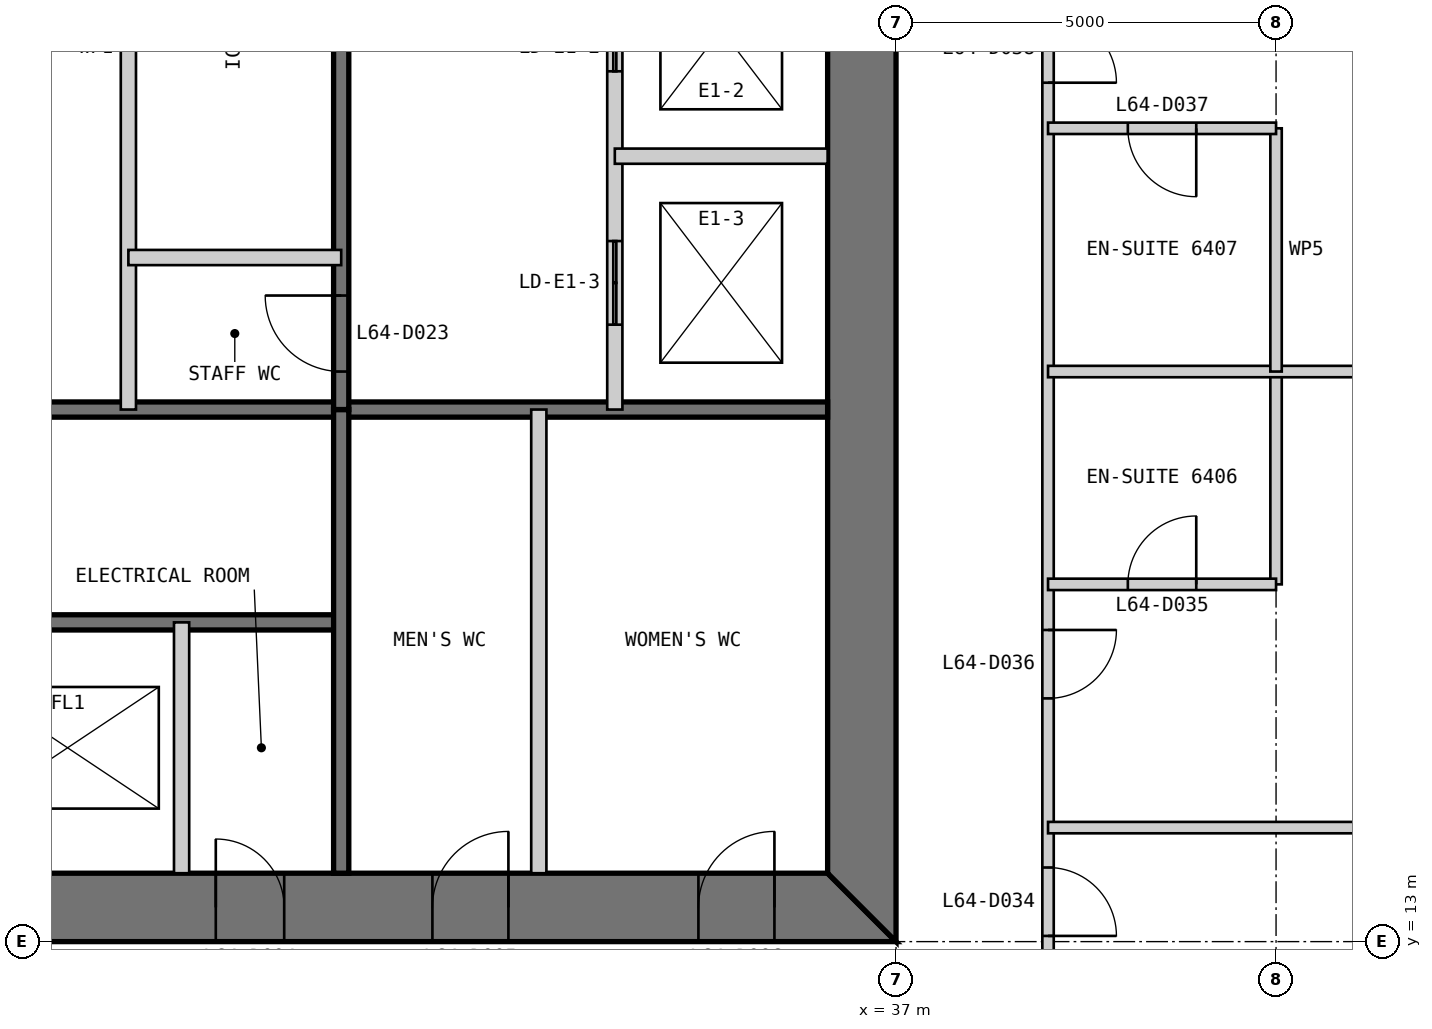
"""IFC4 building model, lengths in metres.
Left out: names, types, materials, properties, quantities, classifications, styles, units other than length and angle.
Written with IfcOpenShell. Run it as: python <this file> out.ifc"""

import sys

from ifc_helpers import new_model, si_unit, direction, frame, frame_2d, origin, place, context, subcontext, project, spatial, polyline, rectangle, outline, extrude, element, fill, save


model = new_model("IFC4")
c1 = context("Model", 3, precision=1e-05, world=origin(), true_north=direction((0.0, 1.0)))
c2 = subcontext(c1, "Body", "Model", "MODEL_VIEW")
j1 = project(units=[si_unit("LENGTHUNIT", "METRE"), si_unit("PLANEANGLEUNIT", "RADIAN")], contexts=[c1])
p1 = place(None, origin())
s1 = spatial("IfcSite", under=j1, at=p1, CompositionType="ELEMENT")
p2 = place(p1, origin())
s2 = spatial("IfcBuilding", under=s1, at=p2, CompositionType="ELEMENT")
p3 = place(p2, frame((0.0, 0.0, 269.6)))
s3 = spatial("IfcBuildingStorey", under=s2, at=p3, CompositionType="ELEMENT", Elevation=269.6)
p4 = place(p3, frame((13.0, 13.45, 0.0), z_axis=(0.0, 0.0, 1.0), x_axis=(1.0, 0.0, 0.0)))
e1 = element("IfcWall", 1, at=p4, inside=s3, PredefinedType="SHEAR", context=c2, shape_type="SweptSolid", body=[
    extrude(outline(polyline([(0.0, -0.45), (24.0, -0.45), (23.1, 0.45), (0.9, 0.45), (0.0, -0.45)])), origin(), (0.0, 0.0, 1.0), 3.4),
])
p5 = place(p4, frame((4.9, 0.0, 0.0)))
e2 = element("IfcOpeningElement", 2, at=p5, cuts=e1, PredefinedType="OPENING", context=c2, shape_type="SweptSolid", body=[
    extrude(rectangle(XDim=1.0, YDim=2.2, at=frame_2d((0.5, 1.1))), frame((0.0, 0.46, 0.0), z_axis=(0.0, -1.0, 0.0), x_axis=(1.0, 0.0, 0.0)), (0.0, 0.0, 1.0), 0.92),
])
p6 = place(p4, frame((8.9, 0.0, 0.0)))
e3 = element("IfcOpeningElement", 3, at=p6, cuts=e1, PredefinedType="OPENING", context=c2, shape_type="SweptSolid", body=[
    extrude(rectangle(XDim=1.1, YDim=2.2, at=frame_2d((0.55, 1.1))), frame((0.0, 0.46, 0.0), z_axis=(0.0, -1.0, 0.0), x_axis=(1.0, 0.0, 0.0)), (0.0, 0.0, 1.0), 0.92),
])
p7 = place(p4, frame((15.05, 0.0, 0.0)))
e4 = element("IfcOpeningElement", 4, at=p7, cuts=e1, PredefinedType="OPENING", context=c2, shape_type="SweptSolid", body=[
    extrude(rectangle(XDim=0.9, YDim=2.2, at=frame_2d((0.45, 1.1))), frame((0.0, 0.46, 0.0), z_axis=(0.0, -1.0, 0.0), x_axis=(1.0, 0.0, 0.0)), (0.0, 0.0, 1.0), 0.92),
])
p8 = place(p4, frame((17.9, 0.0, 0.0)))
e5 = element("IfcOpeningElement", 5, at=p8, cuts=e1, PredefinedType="OPENING", context=c2, shape_type="SweptSolid", body=[
    extrude(rectangle(XDim=1.0, YDim=2.2, at=frame_2d((0.5, 1.1))), frame((0.0, 0.46, 0.0), z_axis=(0.0, -1.0, 0.0), x_axis=(1.0, 0.0, 0.0)), (0.0, 0.0, 1.0), 0.92),
])
p9 = place(p4, frame((21.4, 0.0, 0.0)))
e6 = element("IfcOpeningElement", 6, at=p9, cuts=e1, PredefinedType="OPENING", context=c2, shape_type="SweptSolid", body=[
    extrude(rectangle(XDim=1.0, YDim=2.2, at=frame_2d((0.5, 1.1))), frame((0.0, 0.46, 0.0), z_axis=(0.0, -1.0, 0.0), x_axis=(1.0, 0.0, 0.0)), (0.0, 0.0, 1.0), 0.92),
])
p10 = place(p3, frame((36.55, 13.9, 0.0), z_axis=(0.0, 0.0, 1.0), x_axis=(0.0, 1.0, 0.0)))
e7 = element("IfcWall", 7, at=p10, inside=s3, PredefinedType="SHEAR", context=c2, shape_type="SweptSolid", body=[
    extrude(outline(polyline([(-0.9, -0.45), (23.1, -0.45), (22.2, 0.45), (0.0, 0.45), (-0.9, -0.45)])), origin(), (0.0, 0.0, 1.0), 3.4),
])
p11 = place(p10, frame((20.2, 0.0, 0.0)))
e8 = element("IfcOpeningElement", 8, at=p11, cuts=e7, PredefinedType="OPENING", context=c2, shape_type="SweptSolid", body=[
    extrude(rectangle(XDim=1.0, YDim=2.2, at=frame_2d((0.5, 1.1))), frame((0.0, 0.46, 0.0), z_axis=(0.0, -1.0, 0.0), x_axis=(1.0, 0.0, 0.0)), (0.0, 0.0, 1.0), 0.92),
])
p12 = place(p10, frame((17.25, 0.0, 0.0)))
e9 = element("IfcOpeningElement", 9, at=p12, cuts=e7, PredefinedType="OPENING", context=c2, shape_type="SweptSolid", body=[
    extrude(rectangle(XDim=0.9, YDim=2.2, at=frame_2d((0.45, 1.1))), frame((0.0, 0.46, 0.0), z_axis=(0.0, -1.0, 0.0), x_axis=(1.0, 0.0, 0.0)), (0.0, 0.0, 1.0), 0.92),
])
p13 = place(p3, frame((20.3, 17.2, 0.0), z_axis=(0.0, 0.0, 1.0), x_axis=(1.0, 0.0, 0.0)))
e10 = element("IfcWall", 10, at=p13, inside=s3, PredefinedType="SOLIDWALL", context=c2, shape_type="SweptSolid", body=[
    extrude(rectangle(XDim=9.4, YDim=0.2, at=frame_2d((4.7, 0.0))), origin(), (0.0, 0.0, 1.0), 3.2),
])
p14 = place(p13, frame((0.25, 0.0, 0.0)))
e11 = element("IfcOpeningElement", 11, at=p14, cuts=e10, PredefinedType="OPENING", context=c2, shape_type="SweptSolid", body=[
    extrude(rectangle(XDim=1.0, YDim=2.2, at=frame_2d((0.5, 1.1))), frame((0.0, 0.11, 0.0), z_axis=(0.0, -1.0, 0.0), x_axis=(1.0, 0.0, 0.0)), (0.0, 0.0, 1.0), 0.22),
])
p15 = place(p3, frame((20.3, 20.0, 0.0), z_axis=(0.0, 0.0, 1.0), x_axis=(1.0, 0.0, 0.0)))
e12 = element("IfcWall", 12, at=p15, inside=s3, PredefinedType="SOLIDWALL", context=c2, shape_type="SweptSolid", body=[
    extrude(rectangle(XDim=15.8, YDim=0.2, at=frame_2d((7.9, 0.0))), origin(), (0.0, 0.0, 1.0), 3.2),
])
p16 = place(p3, frame((27.6, 13.9, 0.0), z_axis=(0.0, 0.0, 1.0), x_axis=(0.0, 1.0, 0.0)))
e13 = element("IfcWall", 13, at=p16, inside=s3, PredefinedType="PARTITIONING", context=c2, shape_type="SweptSolid", body=[
    extrude(rectangle(XDim=3.3, YDim=0.2, at=frame_2d((1.65, 0.0))), origin(), (0.0, 0.0, 1.0), 3.2),
])
p17 = place(p3, frame((29.7, 13.9, 0.0), z_axis=(0.0, 0.0, 1.0), x_axis=(0.0, 1.0, 0.0)))
e14 = element("IfcWall", 14, at=p17, inside=s3, PredefinedType="SOLIDWALL", context=c2, shape_type="SweptSolid", body=[
    extrude(rectangle(XDim=6.1, YDim=0.2, at=frame_2d((3.05, 0.0))), origin(), (0.0, 0.0, 1.0), 3.2),
])
p18 = place(p3, frame((32.3, 13.9, 0.0), z_axis=(0.0, 0.0, 1.0), x_axis=(0.0, 1.0, 0.0)))
e15 = element("IfcWall", 15, at=p18, inside=s3, PredefinedType="PARTITIONING", context=c2, shape_type="SweptSolid", body=[
    extrude(rectangle(XDim=6.1, YDim=0.2, at=frame_2d((3.05, 0.0))), origin(), (0.0, 0.0, 1.0), 3.2),
])
p19 = place(p3, frame((33.3, 36.1, 0.0), z_axis=(0.0, 0.0, 1.0), x_axis=(0.0, -1.0, 0.0)))
e16 = element("IfcWall", 16, at=p19, inside=s3, PredefinedType="PARTITIONING", context=c2, shape_type="SweptSolid", body=[
    extrude(rectangle(XDim=16.1, YDim=0.2, at=frame_2d((8.05, 0.0))), origin(), (0.0, 0.0, 1.0), 3.2),
])
p20 = place(p19, frame((7.217, 0.0, 0.0)))
e17 = element("IfcOpeningElement", 17, at=p20, cuts=e16, PredefinedType="OPENING", context=c2, shape_type="SweptSolid", body=[
    extrude(rectangle(XDim=1.1, YDim=2.2, at=frame_2d((0.55, 1.1))), frame((0.0, 0.11, 0.0), z_axis=(0.0, -1.0, 0.0), x_axis=(1.0, 0.0, 0.0)), (0.0, 0.0, 1.0), 0.22),
])
p21 = place(p19, frame((10.55, 0.0, 0.0)))
e18 = element("IfcOpeningElement", 18, at=p21, cuts=e16, PredefinedType="OPENING", context=c2, shape_type="SweptSolid", body=[
    extrude(rectangle(XDim=1.1, YDim=2.2, at=frame_2d((0.55, 1.1))), frame((0.0, 0.11, 0.0), z_axis=(0.0, -1.0, 0.0), x_axis=(1.0, 0.0, 0.0)), (0.0, 0.0, 1.0), 0.22),
])
p22 = place(p19, frame((13.883, 0.0, 0.0)))
e19 = element("IfcOpeningElement", 19, at=p22, cuts=e16, PredefinedType="OPENING", context=c2, shape_type="SweptSolid", body=[
    extrude(rectangle(XDim=1.1, YDim=2.2, at=frame_2d((0.55, 1.1))), frame((0.0, 0.11, 0.0), z_axis=(0.0, -1.0, 0.0), x_axis=(1.0, 0.0, 0.0)), (0.0, 0.0, 1.0), 0.22),
])
p23 = place(p3, frame((29.7, 36.1, 0.0), z_axis=(0.0, 0.0, 1.0), x_axis=(0.0, -1.0, 0.0)))
e20 = element("IfcWall", 20, at=p23, inside=s3, PredefinedType="SOLIDWALL", context=c2, shape_type="SweptSolid", body=[
    extrude(rectangle(XDim=16.1, YDim=0.2, at=frame_2d((8.05, 0.0))), origin(), (0.0, 0.0, 1.0), 3.2),
])
p24 = place(p23, frame((9.65, 0.0, 0.0)))
e21 = element("IfcOpeningElement", 21, at=p24, cuts=e20, PredefinedType="OPENING", context=c2, shape_type="SweptSolid", body=[
    extrude(rectangle(XDim=0.9, YDim=2.2, at=frame_2d((0.45, 1.1))), frame((0.0, 0.11, 0.0), z_axis=(0.0, -1.0, 0.0), x_axis=(1.0, 0.0, 0.0)), (0.0, 0.0, 1.0), 0.22),
])
p25 = place(p23, frame((14.6, 0.0, 0.0)))
e22 = element("IfcOpeningElement", 22, at=p25, cuts=e20, PredefinedType="OPENING", context=c2, shape_type="SweptSolid", body=[
    extrude(rectangle(XDim=1.0, YDim=2.2, at=frame_2d((0.5, 1.1))), frame((0.0, 0.11, 0.0), z_axis=(0.0, -1.0, 0.0), x_axis=(1.0, 0.0, 0.0)), (0.0, 0.0, 1.0), 0.22),
])
p26 = place(p3, frame((36.1, 23.333, 0.0), z_axis=(0.0, 0.0, 1.0), x_axis=(-1.0, 0.0, 0.0)))
e23 = element("IfcWall", 23, at=p26, inside=s3, PredefinedType="PARTITIONING", context=c2, shape_type="SweptSolid", body=[
    extrude(rectangle(XDim=2.8, YDim=0.2, at=frame_2d((1.4, 0.0))), origin(), (0.0, 0.0, 1.0), 3.2),
])
p27 = place(p3, frame((26.9, 30.0, 0.0), z_axis=(0.0, 0.0, 1.0), x_axis=(0.0, -1.0, 0.0)))
e24 = element("IfcWall", 24, at=p27, inside=s3, PredefinedType="PARTITIONING", context=c2, shape_type="SweptSolid", body=[
    extrude(rectangle(XDim=10.0, YDim=0.2, at=frame_2d((5.0, 0.0))), origin(), (0.0, 0.0, 1.0), 3.2),
])
p28 = place(p3, frame((29.7, 22.0, 0.0), z_axis=(0.0, 0.0, 1.0), x_axis=(-1.0, 0.0, 0.0)))
e25 = element("IfcWall", 25, at=p28, inside=s3, PredefinedType="PARTITIONING", context=c2, shape_type="SweptSolid", body=[
    extrude(rectangle(XDim=2.8, YDim=0.2, at=frame_2d((1.4, 0.0))), origin(), (0.0, 0.0, 1.0), 3.2),
])
p29 = place(p3, frame((39.0, 11.0, 0.0), z_axis=(0.0, 0.0, 1.0), x_axis=(0.0, 1.0, 0.0)))
e26 = element("IfcWall", 26, at=p29, inside=s3, PredefinedType="PARTITIONING", context=c2, shape_type="SweptSolid", body=[
    extrude(rectangle(XDim=28.0, YDim=0.15, at=frame_2d((14.0, 0.0))), origin(), (0.0, 0.0, 1.0), 2.844),
])
p30 = place(p29, frame((2.075, 0.0, 0.0)))
e27 = element("IfcOpeningElement", 27, at=p30, cuts=e26, PredefinedType="OPENING", context=c2, shape_type="SweptSolid", body=[
    extrude(rectangle(XDim=0.9, YDim=2.1, at=frame_2d((0.45, 1.05))), frame((0.0, 0.085, 0.0), z_axis=(0.0, -1.0, 0.0), x_axis=(1.0, 0.0, 0.0)), (0.0, 0.0, 1.0), 0.17),
])
p31 = place(p29, frame((5.2, 0.0, 0.0)))
e28 = element("IfcOpeningElement", 28, at=p31, cuts=e26, PredefinedType="OPENING", context=c2, shape_type="SweptSolid", body=[
    extrude(rectangle(XDim=0.9, YDim=2.1, at=frame_2d((0.45, 1.05))), frame((0.0, 0.085, 0.0), z_axis=(0.0, -1.0, 0.0), x_axis=(1.0, 0.0, 0.0)), (0.0, 0.0, 1.0), 0.17),
])
p32 = place(p29, frame((13.3, 0.0, 0.0)))
e29 = element("IfcOpeningElement", 29, at=p32, cuts=e26, PredefinedType="OPENING", context=c2, shape_type="SweptSolid", body=[
    extrude(rectangle(XDim=0.9, YDim=2.1, at=frame_2d((0.45, 1.05))), frame((0.0, 0.085, 0.0), z_axis=(0.0, -1.0, 0.0), x_axis=(1.0, 0.0, 0.0)), (0.0, 0.0, 1.0), 0.17),
])
p33 = place(p29, frame((24.9, 0.0, 0.0)))
e30 = element("IfcOpeningElement", 30, at=p33, cuts=e26, PredefinedType="OPENING", context=c2, shape_type="SweptSolid", body=[
    extrude(rectangle(XDim=0.9, YDim=2.1, at=frame_2d((0.45, 1.05))), frame((0.0, 0.085, 0.0), z_axis=(0.0, -1.0, 0.0), x_axis=(1.0, 0.0, 0.0)), (0.0, 0.0, 1.0), 0.17),
])
p34 = place(p3, frame((49.85, 14.5, 0.0), z_axis=(0.0, 0.0, 1.0), x_axis=(-1.0, 0.0, 0.0)))
e31 = element("IfcWall", 31, at=p34, inside=s3, PredefinedType="PARTITIONING", context=c2, shape_type="SweptSolid", body=[
    extrude(rectangle(XDim=10.85, YDim=0.15, at=frame_2d((5.425, 0.0))), origin(), (0.0, 0.0, 1.0), 3.25),
])
p35 = place(p3, frame((42.0, 17.7, 0.0), z_axis=(0.0, 0.0, 1.0), x_axis=(0.0, 1.0, 0.0)))
e32 = element("IfcWall", 32, at=p35, inside=s3, PredefinedType="PARTITIONING", context=c2, shape_type="SweptSolid", body=[
    extrude(rectangle(XDim=2.8, YDim=0.15, at=frame_2d((1.4, 0.0))), origin(), (0.0, 0.0, 1.0), 3.25),
])
p36 = place(p3, frame((42.0, 17.7, 0.0), z_axis=(0.0, 0.0, 1.0), x_axis=(-1.0, 0.0, 0.0)))
e33 = element("IfcWall", 33, at=p36, inside=s3, PredefinedType="PARTITIONING", context=c2, shape_type="SweptSolid", body=[
    extrude(rectangle(XDim=3.0, YDim=0.15, at=frame_2d((1.5, 0.0))), origin(), (0.0, 0.0, 1.0), 3.25),
])
p37 = place(p36, frame((1.05, 0.0, 0.0)))
e34 = element("IfcOpeningElement", 34, at=p37, cuts=e33, PredefinedType="OPENING", context=c2, shape_type="SweptSolid", body=[
    extrude(rectangle(XDim=0.9, YDim=2.1, at=frame_2d((0.45, 1.05))), frame((0.0, 0.085, 0.0), z_axis=(0.0, -1.0, 0.0), x_axis=(1.0, 0.0, 0.0)), (0.0, 0.0, 1.0), 0.17),
])
p38 = place(p3, frame((49.85, 20.5, 0.0), z_axis=(0.0, 0.0, 1.0), x_axis=(-1.0, 0.0, 0.0)))
e35 = element("IfcWall", 35, at=p38, inside=s3, PredefinedType="PARTITIONING", context=c2, shape_type="SweptSolid", body=[
    extrude(rectangle(XDim=10.85, YDim=0.15, at=frame_2d((5.425, 0.0))), origin(), (0.0, 0.0, 1.0), 3.25),
])
p39 = place(p3, frame((42.0, 20.5, 0.0), z_axis=(0.0, 0.0, 1.0), x_axis=(0.0, 1.0, 0.0)))
e36 = element("IfcWall", 36, at=p39, inside=s3, PredefinedType="PARTITIONING", context=c2, shape_type="SweptSolid", body=[
    extrude(rectangle(XDim=3.2, YDim=0.15, at=frame_2d((1.6, 0.0))), origin(), (0.0, 0.0, 1.0), 3.25),
])
p40 = place(p3, frame((42.0, 23.7, 0.0), z_axis=(0.0, 0.0, 1.0), x_axis=(-1.0, 0.0, 0.0)))
e37 = element("IfcWall", 37, at=p40, inside=s3, PredefinedType="PARTITIONING", context=c2, shape_type="SweptSolid", body=[
    extrude(rectangle(XDim=3.0, YDim=0.15, at=frame_2d((1.5, 0.0))), origin(), (0.0, 0.0, 1.0), 3.25),
])
p41 = place(p40, frame((1.05, 0.0, 0.0)))
e38 = element("IfcOpeningElement", 38, at=p41, cuts=e37, PredefinedType="OPENING", context=c2, shape_type="SweptSolid", body=[
    extrude(rectangle(XDim=0.9, YDim=2.1, at=frame_2d((0.45, 1.05))), frame((0.0, 0.085, 0.0), z_axis=(0.0, -1.0, 0.0), x_axis=(1.0, 0.0, 0.0)), (0.0, 0.0, 1.0), 0.17),
])
p42 = place(p7, origin())
e39 = element("IfcDoor", 39, at=p42, inside=s3, OperationType="SINGLE_SWING_LEFT", PredefinedType="DOOR", context=c2, shape_type="SweptSolid", body=[
    extrude(rectangle(XDim=0.9, YDim=2.2, at=frame_2d((0.45, 1.1))), frame((0.0, 0.025, 0.0), z_axis=(0.0, -1.0, 0.0), x_axis=(1.0, 0.0, 0.0)), (0.0, 0.0, 1.0), 0.05),
    extrude(outline(polyline([(0.0, 0.0), (0.04, 0.0), (0.04, 2.16), (0.86, 2.16), (0.86, 0.0), (0.9, 0.0), (0.9, 2.2), (0.0, 2.2), (0.0, 0.0)])), frame((0.0, 0.3, 0.0), z_axis=(0.0, -1.0, 0.0), x_axis=(1.0, 0.0, 0.0)), (0.0, 0.0, 1.0), 0.6),
])
fill(e4, e39)
p43 = place(p8, origin())
e40 = element("IfcDoor", 40, at=p43, inside=s3, OperationType="SINGLE_SWING_RIGHT", PredefinedType="DOOR", context=c2, shape_type="SweptSolid", body=[
    extrude(rectangle(XDim=1.0, YDim=2.2, at=frame_2d((0.5, 1.1))), frame((0.0, 0.025, 0.0), z_axis=(0.0, -1.0, 0.0), x_axis=(1.0, 0.0, 0.0)), (0.0, 0.0, 1.0), 0.05),
    extrude(outline(polyline([(0.0, 0.0), (0.04, 0.0), (0.04, 2.16), (0.96, 2.16), (0.96, 0.0), (1.0, 0.0), (1.0, 2.2), (0.0, 2.2), (0.0, 0.0)])), frame((0.0, 0.3, 0.0), z_axis=(0.0, -1.0, 0.0), x_axis=(1.0, 0.0, 0.0)), (0.0, 0.0, 1.0), 0.6),
])
fill(e5, e40)
p44 = place(p9, origin())
e41 = element("IfcDoor", 41, at=p44, inside=s3, OperationType="SINGLE_SWING_RIGHT", PredefinedType="DOOR", context=c2, shape_type="SweptSolid", body=[
    extrude(rectangle(XDim=1.0, YDim=2.2, at=frame_2d((0.5, 1.1))), frame((0.0, 0.025, 0.0), z_axis=(0.0, -1.0, 0.0), x_axis=(1.0, 0.0, 0.0)), (0.0, 0.0, 1.0), 0.05),
    extrude(outline(polyline([(0.0, 0.0), (0.04, 0.0), (0.04, 2.16), (0.96, 2.16), (0.96, 0.0), (1.0, 0.0), (1.0, 2.2), (0.0, 2.2), (0.0, 0.0)])), frame((0.0, 0.3, 0.0), z_axis=(0.0, -1.0, 0.0), x_axis=(1.0, 0.0, 0.0)), (0.0, 0.0, 1.0), 0.6),
])
fill(e6, e41)
p45 = place(p25, frame((1.0, 0.0, 0.0), z_axis=(0.0, 0.0, 1.0), x_axis=(-1.0, 0.0, 0.0)))
e42 = element("IfcDoor", 42, at=p45, inside=s3, OperationType="SINGLE_SWING_RIGHT", PredefinedType="DOOR", context=c2, shape_type="SweptSolid", body=[
    extrude(rectangle(XDim=1.0, YDim=2.2, at=frame_2d((0.5, 1.1))), frame((0.0, 0.025, 0.0), z_axis=(0.0, -1.0, 0.0), x_axis=(1.0, 0.0, 0.0)), (0.0, 0.0, 1.0), 0.05),
])
fill(e22, e42)
p46 = place(p30, frame((0.9, 0.0, 0.0), z_axis=(0.0, 0.0, 1.0), x_axis=(-1.0, 0.0, 0.0)))
e43 = element("IfcDoor", 43, at=p46, inside=s3, OperationType="SINGLE_SWING_RIGHT", PredefinedType="DOOR", context=c2, shape_type="SweptSolid", body=[
    extrude(rectangle(XDim=0.9, YDim=2.1, at=frame_2d((0.45, 1.05))), frame((0.0, 0.025, 0.0), z_axis=(0.0, -1.0, 0.0), x_axis=(1.0, 0.0, 0.0)), (0.0, 0.0, 1.0), 0.05),
])
fill(e27, e43)
p47 = place(p37, frame((0.9, 0.0, 0.0), z_axis=(0.0, 0.0, 1.0), x_axis=(-1.0, 0.0, 0.0)))
e44 = element("IfcDoor", 44, at=p47, inside=s3, OperationType="SINGLE_SWING_RIGHT", PredefinedType="DOOR", context=c2, shape_type="SweptSolid", body=[
    extrude(rectangle(XDim=0.9, YDim=2.1, at=frame_2d((0.45, 1.05))), frame((0.0, 0.025, 0.0), z_axis=(0.0, -1.0, 0.0), x_axis=(1.0, 0.0, 0.0)), (0.0, 0.0, 1.0), 0.05),
])
fill(e34, e44)
p48 = place(p31, frame((0.9, 0.0, 0.0), z_axis=(0.0, 0.0, 1.0), x_axis=(-1.0, 0.0, 0.0)))
e45 = element("IfcDoor", 45, at=p48, inside=s3, OperationType="SINGLE_SWING_LEFT", PredefinedType="DOOR", context=c2, shape_type="SweptSolid", body=[
    extrude(rectangle(XDim=0.9, YDim=2.1, at=frame_2d((0.45, 1.05))), frame((0.0, 0.025, 0.0), z_axis=(0.0, -1.0, 0.0), x_axis=(1.0, 0.0, 0.0)), (0.0, 0.0, 1.0), 0.05),
])
fill(e28, e45)
p49 = place(p41, origin())
e46 = element("IfcDoor", 46, at=p49, inside=s3, OperationType="SINGLE_SWING_LEFT", PredefinedType="DOOR", context=c2, shape_type="SweptSolid", body=[
    extrude(rectangle(XDim=0.9, YDim=2.1, at=frame_2d((0.45, 1.05))), frame((0.0, 0.025, 0.0), z_axis=(0.0, -1.0, 0.0), x_axis=(1.0, 0.0, 0.0)), (0.0, 0.0, 1.0), 0.05),
])
fill(e38, e46)
p50 = place(p32, frame((0.9, 0.0, 0.0), z_axis=(0.0, 0.0, 1.0), x_axis=(-1.0, 0.0, 0.0)))
e47 = element("IfcDoor", 47, at=p50, inside=s3, OperationType="SINGLE_SWING_RIGHT", PredefinedType="DOOR", context=c2, shape_type="SweptSolid", body=[
    extrude(rectangle(XDim=0.9, YDim=2.1, at=frame_2d((0.45, 1.05))), frame((0.0, 0.025, 0.0), z_axis=(0.0, -1.0, 0.0), x_axis=(1.0, 0.0, 0.0)), (0.0, 0.0, 1.0), 0.05),
])
fill(e29, e47)
p51 = place(p21, origin())
e48 = element("IfcDoor", 48, at=p51, inside=s3, OperationType="DOUBLE_DOOR_SLIDING", PredefinedType="DOOR", context=c2, shape_type="SweptSolid", body=[
    extrude(rectangle(XDim=1.1, YDim=2.2, at=frame_2d((0.55, 1.1))), frame((0.0, 0.025, 0.0), z_axis=(0.0, -1.0, 0.0), x_axis=(1.0, 0.0, 0.0)), (0.0, 0.0, 1.0), 0.05),
])
fill(e18, e48)
p52 = place(p22, origin())
e49 = element("IfcDoor", 49, at=p52, inside=s3, OperationType="DOUBLE_DOOR_SLIDING", PredefinedType="DOOR", context=c2, shape_type="SweptSolid", body=[
    extrude(rectangle(XDim=1.1, YDim=2.2, at=frame_2d((0.55, 1.1))), frame((0.0, 0.025, 0.0), z_axis=(0.0, -1.0, 0.0), x_axis=(1.0, 0.0, 0.0)), (0.0, 0.0, 1.0), 0.05),
])
fill(e19, e49)
save(model, sys.argv[1])
